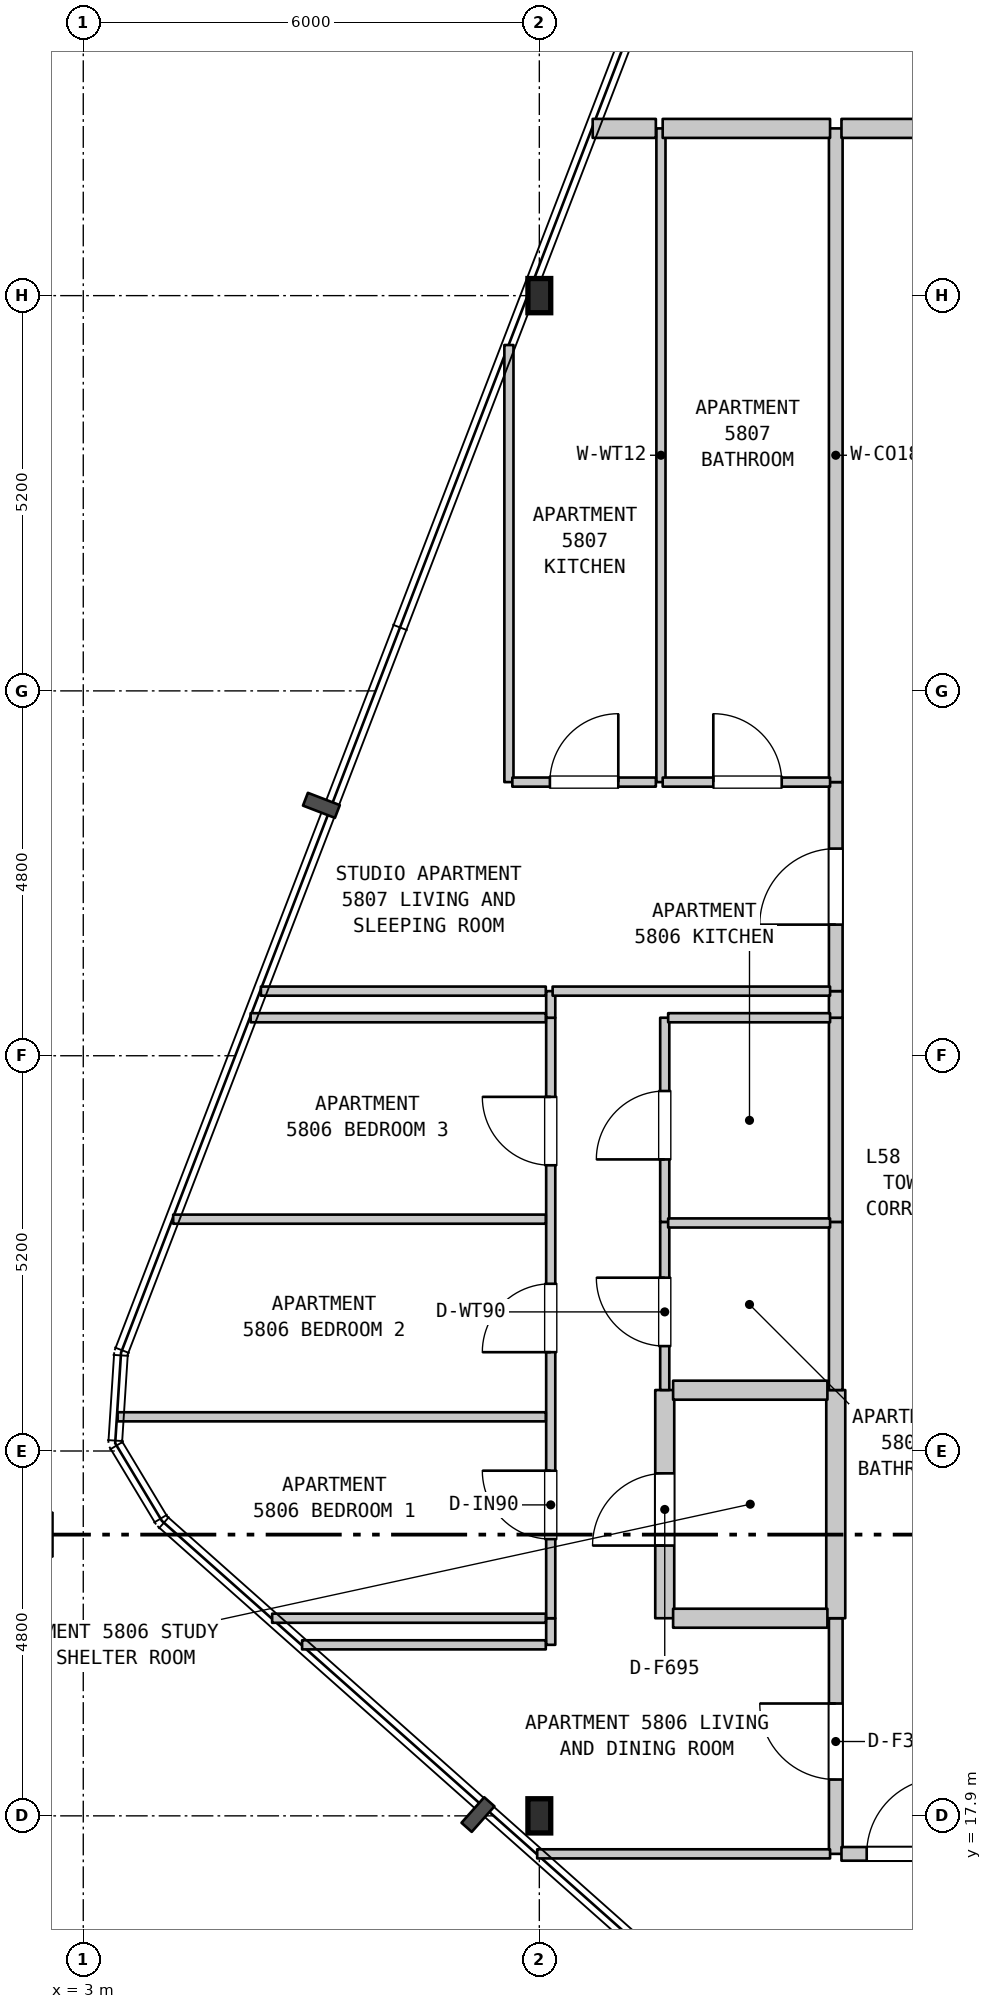
"""IFC4 building model, lengths in metres.
Left out: names, types, materials, properties, quantities, classifications, styles, units other than length and angle.
Written with IfcOpenShell. Run it as: python <this file> out.ifc"""

import sys

from ifc_helpers import new_model, si_unit, direction, frame, frame_2d, origin, origin_2d, place, context, subcontext, project, spatial, rectangle, i_section, extrude, element, fill, save


model = new_model("IFC4")
c1 = context("Model", 3, precision=1e-05, world=origin(), true_north=direction((0.0, 1.0)))
c2 = subcontext(c1, "Body", "Model", "MODEL_VIEW")
j1 = project(units=[si_unit("LENGTHUNIT", "METRE"), si_unit("PLANEANGLEUNIT", "RADIAN")], contexts=[c1])
p1 = place(None, origin())
s1 = spatial("IfcSite", under=j1, at=p1, CompositionType="ELEMENT")
p2 = place(p1, origin())
s2 = spatial("IfcBuilding", under=s1, at=p2, CompositionType="ELEMENT")
p3 = place(p2, frame((0.0, 0.0, 233.9)))
s3 = spatial("IfcBuildingStorey", under=s2, at=p3, CompositionType="ELEMENT", Elevation=233.9)
for number, where, z_axis, x_axis in (
    (1, (9.0, 17.9, 0.0), (0.0, 0.0, 1.0), (1.0, 0.0, 0.0)),
    (2, (9.0, 37.9, 0.0), (0.0, 0.0, 1.0), (1.0, 0.0, 0.0)),
):
    element("IfcColumn", number, at=place(p3, frame(where, z_axis=z_axis, x_axis=x_axis)), inside=s3, PredefinedType="COLUMN", context=c2, shape_type="SweptSolid", body=[
        extrude(i_section(OverallWidth=0.3, OverallDepth=0.45, WebThickness=0.014, FlangeThickness=0.026, FilletRadius=0.027, at=origin_2d()), origin(), (0.0, 0.0, 1.0), 3.7),
    ])
p4 = place(p3, frame((8.6, 31.5, 0.0), z_axis=(0.0, 0.0, 1.0), x_axis=(0.0, 1.0, 0.0)))
e3 = element("IfcWall", 3, at=p4, inside=s3, PredefinedType="PARTITIONING", context=c2, shape_type="SweptSolid", body=[
    extrude(rectangle(XDim=5.75, YDim=0.12, at=frame_2d((2.875, 0.0))), origin(), (0.0, 0.0, 1.0), 3.28),
])
p5 = place(p3, frame((9.15, 20.15, 0.0), z_axis=(0.0, 0.0, 1.0), x_axis=(0.0, 1.0, 0.0)))
e4 = element("IfcWall", 4, at=p5, inside=s3, PredefinedType="PARTITIONING", context=c2, shape_type="SweptSolid", body=[
    extrude(rectangle(XDim=0.35, YDim=0.12, at=frame_2d((0.175, 0.0))), origin(), (0.0, 0.0, 1.0), 3.28),
])
p6 = place(p3, frame((9.15, 20.5, 0.0), z_axis=(0.0, 0.0, 1.0), x_axis=(0.0, 1.0, 0.0)))
e5 = element("IfcWall", 5, at=p6, inside=s3, PredefinedType="PARTITIONING", context=c2, shape_type="SweptSolid", body=[
    extrude(rectangle(XDim=7.9, YDim=0.12, at=frame_2d((3.95, 0.0))), origin(), (0.0, 0.0, 1.0), 2.68),
])
p7 = place(p6, frame((1.041, 0.0, 0.0)))
e6 = element("IfcOpeningElement", 6, at=p7, cuts=e5, PredefinedType="OPENING", context=c2, shape_type="SweptSolid", body=[
    extrude(rectangle(XDim=0.9, YDim=2.15, at=frame_2d((0.45, 1.075))), frame((0.0, 0.07, 0.0), z_axis=(0.0, -1.0, 0.0), x_axis=(1.0, 0.0, 0.0)), (0.0, 0.0, 1.0), 0.14),
])
p8 = place(p6, frame((3.5, 0.0, 0.0)))
e7 = element("IfcOpeningElement", 7, at=p8, cuts=e5, PredefinedType="OPENING", context=c2, shape_type="SweptSolid", body=[
    extrude(rectangle(XDim=0.9, YDim=2.15, at=frame_2d((0.45, 1.075))), frame((0.0, 0.07, 0.0), z_axis=(0.0, -1.0, 0.0), x_axis=(1.0, 0.0, 0.0)), (0.0, 0.0, 1.0), 0.14),
])
p9 = place(p6, frame((5.959, 0.0, 0.0)))
e8 = element("IfcOpeningElement", 8, at=p9, cuts=e5, PredefinedType="OPENING", context=c2, shape_type="SweptSolid", body=[
    extrude(rectangle(XDim=0.9, YDim=2.15, at=frame_2d((0.45, 1.075))), frame((0.0, 0.07, 0.0), z_axis=(0.0, -1.0, 0.0), x_axis=(1.0, 0.0, 0.0)), (0.0, 0.0, 1.0), 0.14),
])
p10 = place(p3, frame((9.15, 28.4, 0.0), z_axis=(0.0, 0.0, 1.0), x_axis=(0.0, 1.0, 0.0)))
e9 = element("IfcWall", 9, at=p10, inside=s3, PredefinedType="PARTITIONING", context=c2, shape_type="SweptSolid", body=[
    extrude(rectangle(XDim=0.35, YDim=0.12, at=frame_2d((0.175, 0.0))), origin(), (0.0, 0.0, 1.0), 3.28),
])
p11 = place(p3, frame((10.6, 31.5, 0.0), z_axis=(0.0, 0.0, 1.0), x_axis=(0.0, 1.0, 0.0)))
e10 = element("IfcWall", 10, at=p11, inside=s3, PredefinedType="PARTITIONING", context=c2, shape_type="SweptSolid", body=[
    extrude(rectangle(XDim=8.6, YDim=0.12, at=frame_2d((4.3, 0.0))), origin(), (0.0, 0.0, 1.0), 3.28),
])
p12 = place(p3, frame((10.65, 20.5, 0.0), z_axis=(0.0, 0.0, 1.0), x_axis=(0.0, 1.0, 0.0)))
e11 = element("IfcWall", 11, at=p12, inside=s3, PredefinedType="STANDARD", context=c2, shape_type="SweptSolid", body=[
    extrude(rectangle(XDim=3.002, YDim=0.25, at=frame_2d((1.501, 0.0))), origin(), (0.0, 0.0, 1.0), 3.28),
])
p13 = place(p12, frame((0.956, 0.0, 0.0)))
e12 = element("IfcOpeningElement", 12, at=p13, cuts=e11, PredefinedType="OPENING", context=c2, shape_type="SweptSolid", body=[
    extrude(rectangle(XDim=0.95, YDim=2.15, at=frame_2d((0.475, 1.075))), frame((0.0, 0.135, 0.0), z_axis=(0.0, -1.0, 0.0), x_axis=(1.0, 0.0, 0.0)), (0.0, 0.0, 1.0), 0.27),
])
p14 = place(p3, frame((10.65, 23.502, 0.0), z_axis=(0.0, 0.0, 1.0), x_axis=(0.0, 1.0, 0.0)))
e13 = element("IfcWall", 13, at=p14, inside=s3, PredefinedType="PARTITIONING", context=c2, shape_type="SweptSolid", body=[
    extrude(rectangle(XDim=2.212, YDim=0.12, at=frame_2d((1.106, 0.0))), origin(), (0.0, 0.0, 1.0), 3.28),
])
p15 = place(p14, frame((0.578, 0.0, 0.0)))
e14 = element("IfcOpeningElement", 14, at=p15, cuts=e13, PredefinedType="OPENING", context=c2, shape_type="SweptSolid", body=[
    extrude(rectangle(XDim=0.9, YDim=2.1, at=frame_2d((0.45, 1.05))), frame((0.0, 0.07, 0.0), z_axis=(0.0, -1.0, 0.0), x_axis=(1.0, 0.0, 0.0)), (0.0, 0.0, 1.0), 0.14),
])
p16 = place(p3, frame((10.65, 25.714, 0.0), z_axis=(0.0, 0.0, 1.0), x_axis=(0.0, 1.0, 0.0)))
e15 = element("IfcWall", 15, at=p16, inside=s3, PredefinedType="PARTITIONING", context=c2, shape_type="SweptSolid", body=[
    extrude(rectangle(XDim=2.686, YDim=0.12, at=frame_2d((1.343, 0.0))), origin(), (0.0, 0.0, 1.0), 3.28),
])
p17 = place(p16, frame((0.822, 0.0, 0.0)))
e16 = element("IfcOpeningElement", 16, at=p17, cuts=e15, PredefinedType="OPENING", context=c2, shape_type="SweptSolid", body=[
    extrude(rectangle(XDim=0.9, YDim=2.15, at=frame_2d((0.45, 1.075))), frame((0.0, 0.07, 0.0), z_axis=(0.0, -1.0, 0.0), x_axis=(1.0, 0.0, 0.0)), (0.0, 0.0, 1.0), 0.14),
])
p18 = place(p3, frame((12.9, 17.4, 0.0), z_axis=(0.0, 0.0, 1.0), x_axis=(0.0, 1.0, 0.0)))
e17 = element("IfcWall", 17, at=p18, inside=s3, PredefinedType="STANDARD", context=c2, shape_type="SweptSolid", body=[
    extrude(rectangle(XDim=3.1, YDim=0.18, at=frame_2d((1.55, 0.0))), origin(), (0.0, 0.0, 1.0), 3.28),
])
p19 = place(p18, frame((0.978, 0.0, 0.0)))
e18 = element("IfcOpeningElement", 18, at=p19, cuts=e17, PredefinedType="OPENING", context=c2, shape_type="SweptSolid", body=[
    extrude(rectangle(XDim=1.0, YDim=2.15, at=frame_2d((0.5, 1.075))), frame((0.0, 0.1, 0.0), z_axis=(0.0, -1.0, 0.0), x_axis=(1.0, 0.0, 0.0)), (0.0, 0.0, 1.0), 0.2),
])
p20 = place(p3, frame((12.9, 20.5, 0.0), z_axis=(0.0, 0.0, 1.0), x_axis=(0.0, 1.0, 0.0)))
e19 = element("IfcWall", 19, at=p20, inside=s3, PredefinedType="STANDARD", context=c2, shape_type="SweptSolid", body=[
    extrude(rectangle(XDim=3.002, YDim=0.25, at=frame_2d((1.501, 0.0))), origin(), (0.0, 0.0, 1.0), 3.28),
])
p21 = place(p3, frame((12.9, 23.502, 0.0), z_axis=(0.0, 0.0, 1.0), x_axis=(0.0, 1.0, 0.0)))
e20 = element("IfcWall", 20, at=p21, inside=s3, PredefinedType="STANDARD", context=c2, shape_type="SweptSolid", body=[
    extrude(rectangle(XDim=2.212, YDim=0.18, at=frame_2d((1.106, 0.0))), origin(), (0.0, 0.0, 1.0), 3.28),
])
p22 = place(p3, frame((12.9, 25.714, 0.0), z_axis=(0.0, 0.0, 1.0), x_axis=(0.0, 1.0, 0.0)))
e21 = element("IfcWall", 21, at=p22, inside=s3, PredefinedType="STANDARD", context=c2, shape_type="SweptSolid", body=[
    extrude(rectangle(XDim=2.686, YDim=0.18, at=frame_2d((1.343, 0.0))), origin(), (0.0, 0.0, 1.0), 3.28),
])
p23 = place(p3, frame((12.9, 28.4, 0.0), z_axis=(0.0, 0.0, 1.0), x_axis=(0.0, 1.0, 0.0)))
e22 = element("IfcWall", 22, at=p23, inside=s3, PredefinedType="STANDARD", context=c2, shape_type="SweptSolid", body=[
    extrude(rectangle(XDim=0.35, YDim=0.18, at=frame_2d((0.175, 0.0))), origin(), (0.0, 0.0, 1.0), 3.28),
])
p24 = place(p3, frame((12.9, 28.75, 0.0), z_axis=(0.0, 0.0, 1.0), x_axis=(0.0, 1.0, 0.0)))
e23 = element("IfcWall", 23, at=p24, inside=s3, PredefinedType="STANDARD", context=c2, shape_type="SweptSolid", body=[
    extrude(rectangle(XDim=2.75, YDim=0.18, at=frame_2d((1.375, 0.0))), origin(), (0.0, 0.0, 1.0), 3.28),
])
p25 = place(p24, frame((0.875, 0.0, 0.0)))
e24 = element("IfcOpeningElement", 24, at=p25, cuts=e23, PredefinedType="OPENING", context=c2, shape_type="SweptSolid", body=[
    extrude(rectangle(XDim=1.0, YDim=2.15, at=frame_2d((0.5, 1.075))), frame((0.0, 0.1, 0.0), z_axis=(0.0, -1.0, 0.0), x_axis=(1.0, 0.0, 0.0)), (0.0, 0.0, 1.0), 0.2),
])
p26 = place(p3, frame((12.9, 31.5, 0.0), z_axis=(0.0, 0.0, 1.0), x_axis=(0.0, 1.0, 0.0)))
e25 = element("IfcWall", 25, at=p26, inside=s3, PredefinedType="STANDARD", context=c2, shape_type="SweptSolid", body=[
    extrude(rectangle(XDim=8.6, YDim=0.18, at=frame_2d((4.3, 0.0))), origin(), (0.0, 0.0, 1.0), 3.28),
])
p27 = place(p3, frame((8.972, 17.4, 0.0), z_axis=(0.0, 0.0, 1.0), x_axis=(1.0, 0.0, 0.0)))
e26 = element("IfcWall", 26, at=p27, inside=s3, PredefinedType="PARTITIONING", context=c2, shape_type="SweptSolid", body=[
    extrude(rectangle(XDim=3.853, YDim=0.12, at=frame_2d((1.927, 0.0))), origin(), (0.0, 0.0, 1.0), 3.28),
])
p28 = place(p3, frame((12.975, 17.4, 0.0), z_axis=(0.0, 0.0, 1.0), x_axis=(1.0, 0.0, 0.0)))
e27 = element("IfcWall", 27, at=p28, inside=s3, PredefinedType="STANDARD", context=c2, shape_type="SweptSolid", body=[
    extrude(rectangle(XDim=3.18, YDim=0.18, at=frame_2d((1.59, 0.0))), origin(), (0.0, 0.0, 1.0), 3.28),
])
p29 = place(p28, frame((0.332, 0.0, 0.0)))
e28 = element("IfcOpeningElement", 28, at=p29, cuts=e27, PredefinedType="OPENING", context=c2, shape_type="SweptSolid", body=[
    extrude(rectangle(XDim=1.0, YDim=2.15, at=frame_2d((0.5, 1.075))), frame((0.0, 0.1, 0.0), z_axis=(0.0, -1.0, 0.0), x_axis=(1.0, 0.0, 0.0)), (0.0, 0.0, 1.0), 0.2),
])
p30 = place(p3, frame((5.879, 20.15, 0.0), z_axis=(0.0, 0.0, 1.0), x_axis=(1.0, 0.0, 0.0)))
e29 = element("IfcWall", 29, at=p30, inside=s3, PredefinedType="PARTITIONING", context=c2, shape_type="SweptSolid", body=[
    extrude(rectangle(XDim=3.206, YDim=0.12, at=frame_2d((1.603, 0.0))), origin(), (0.0, 0.0, 1.0), 3.28),
])
p31 = place(p3, frame((5.485, 20.5, 0.0), z_axis=(0.0, 0.0, 1.0), x_axis=(1.0, 0.0, 0.0)))
e30 = element("IfcWall", 30, at=p31, inside=s3, PredefinedType="PARTITIONING", context=c2, shape_type="SweptSolid", body=[
    extrude(rectangle(XDim=3.6, YDim=0.12, at=frame_2d((1.8, 0.0))), origin(), (0.0, 0.0, 1.0), 3.28),
])
p32 = place(p3, frame((10.76, 20.5, 0.0), z_axis=(0.0, 0.0, 1.0), x_axis=(1.0, 0.0, 0.0)))
e31 = element("IfcWall", 31, at=p32, inside=s3, PredefinedType="STANDARD", context=c2, shape_type="SweptSolid", body=[
    extrude(rectangle(XDim=2.03, YDim=0.25, at=frame_2d((1.015, 0.0))), origin(), (0.0, 0.0, 1.0), 3.28),
])
p33 = place(p3, frame((3.452, 23.15, 0.0), z_axis=(0.0, 0.0, 1.0), x_axis=(1.0, 0.0, 0.0)))
e32 = element("IfcWall", 32, at=p33, inside=s3, PredefinedType="PARTITIONING", context=c2, shape_type="SweptSolid", body=[
    extrude(rectangle(XDim=5.633, YDim=0.12, at=frame_2d((2.816, 0.0))), origin(), (0.0, 0.0, 1.0), 3.28),
])
p34 = place(p3, frame((10.76, 23.5, 0.0), z_axis=(0.0, 0.0, 1.0), x_axis=(1.0, 0.0, 0.0)))
e33 = element("IfcWall", 33, at=p34, inside=s3, PredefinedType="STANDARD", context=c2, shape_type="SweptSolid", body=[
    extrude(rectangle(XDim=2.03, YDim=0.25, at=frame_2d((1.015, 0.0))), origin(), (0.0, 0.0, 1.0), 3.28),
])
p35 = place(p3, frame((10.695, 25.7, 0.0), z_axis=(0.0, 0.0, 1.0), x_axis=(1.0, 0.0, 0.0)))
e34 = element("IfcWall", 34, at=p35, inside=s3, PredefinedType="PARTITIONING", context=c2, shape_type="SweptSolid", body=[
    extrude(rectangle(XDim=2.13, YDim=0.12, at=frame_2d((1.065, 0.0))), origin(), (0.0, 0.0, 1.0), 3.28),
])
p36 = place(p3, frame((4.183, 25.75, 0.0), z_axis=(0.0, 0.0, 1.0), x_axis=(1.0, 0.0, 0.0)))
e35 = element("IfcWall", 35, at=p36, inside=s3, PredefinedType="PARTITIONING", context=c2, shape_type="SweptSolid", body=[
    extrude(rectangle(XDim=4.902, YDim=0.12, at=frame_2d((2.451, 0.0))), origin(), (0.0, 0.0, 1.0), 3.28),
])
p37 = place(p3, frame((5.202, 28.4, 0.0), z_axis=(0.0, 0.0, 1.0), x_axis=(1.0, 0.0, 0.0)))
e36 = element("IfcWall", 36, at=p37, inside=s3, PredefinedType="PARTITIONING", context=c2, shape_type="SweptSolid", body=[
    extrude(rectangle(XDim=3.883, YDim=0.12, at=frame_2d((1.941, 0.0))), origin(), (0.0, 0.0, 1.0), 3.28),
])
p38 = place(p3, frame((10.695, 28.4, 0.0), z_axis=(0.0, 0.0, 1.0), x_axis=(1.0, 0.0, 0.0)))
e37 = element("IfcWall", 37, at=p38, inside=s3, PredefinedType="PARTITIONING", context=c2, shape_type="SweptSolid", body=[
    extrude(rectangle(XDim=2.13, YDim=0.12, at=frame_2d((1.065, 0.0))), origin(), (0.0, 0.0, 1.0), 3.28),
])
p39 = place(p3, frame((5.337, 28.75, 0.0), z_axis=(0.0, 0.0, 1.0), x_axis=(1.0, 0.0, 0.0)))
e38 = element("IfcWall", 38, at=p39, inside=s3, PredefinedType="PARTITIONING", context=c2, shape_type="SweptSolid", body=[
    extrude(rectangle(XDim=3.748, YDim=0.12, at=frame_2d((1.874, 0.0))), origin(), (0.0, 0.0, 1.0), 3.28),
])
p40 = place(p3, frame((9.175, 28.75, 0.0), z_axis=(0.0, 0.0, 1.0), x_axis=(1.0, 0.0, 0.0)))
e39 = element("IfcWall", 39, at=p40, inside=s3, PredefinedType="PARTITIONING", context=c2, shape_type="SweptSolid", body=[
    extrude(rectangle(XDim=3.65, YDim=0.12, at=frame_2d((1.825, 0.0))), origin(), (0.0, 0.0, 1.0), 3.28),
])
p41 = place(p3, frame((8.645, 31.5, 0.0), z_axis=(0.0, 0.0, 1.0), x_axis=(1.0, 0.0, 0.0)))
e40 = element("IfcWall", 40, at=p41, inside=s3, PredefinedType="PARTITIONING", context=c2, shape_type="SweptSolid", body=[
    extrude(rectangle(XDim=1.888, YDim=0.12, at=frame_2d((0.944, 0.0))), origin(), (0.0, 0.0, 1.0), 3.28),
])
p42 = place(p41, frame((0.494, 0.0, 0.0)))
e41 = element("IfcOpeningElement", 41, at=p42, cuts=e40, PredefinedType="OPENING", context=c2, shape_type="SweptSolid", body=[
    extrude(rectangle(XDim=0.9, YDim=2.15, at=frame_2d((0.45, 1.075))), frame((0.0, 0.07, 0.0), z_axis=(0.0, -1.0, 0.0), x_axis=(1.0, 0.0, 0.0)), (0.0, 0.0, 1.0), 0.14),
])
p43 = place(p3, frame((10.623, 31.5, 0.0), z_axis=(0.0, 0.0, 1.0), x_axis=(1.0, 0.0, 0.0)))
e42 = element("IfcWall", 42, at=p43, inside=s3, PredefinedType="PARTITIONING", context=c2, shape_type="SweptSolid", body=[
    extrude(rectangle(XDim=2.202, YDim=0.12, at=frame_2d((1.101, 0.0))), origin(), (0.0, 0.0, 1.0), 3.28),
])
p44 = place(p43, frame((0.666, 0.0, 0.0)))
e43 = element("IfcOpeningElement", 43, at=p44, cuts=e42, PredefinedType="OPENING", context=c2, shape_type="SweptSolid", body=[
    extrude(rectangle(XDim=0.9, YDim=2.1, at=frame_2d((0.45, 1.05))), frame((0.0, 0.07, 0.0), z_axis=(0.0, -1.0, 0.0), x_axis=(1.0, 0.0, 0.0)), (0.0, 0.0, 1.0), 0.14),
])
p45 = place(p3, frame((9.702, 40.1, 0.0), z_axis=(0.0, 0.0, 1.0), x_axis=(1.0, 0.0, 0.0)))
e44 = element("IfcWall", 44, at=p45, inside=s3, PredefinedType="STANDARD", context=c2, shape_type="SweptSolid", body=[
    extrude(rectangle(XDim=0.831, YDim=0.25, at=frame_2d((0.416, 0.0))), origin(), (0.0, 0.0, 1.0), 3.28),
])
p46 = place(p3, frame((10.623, 40.1, 0.0), z_axis=(0.0, 0.0, 1.0), x_axis=(1.0, 0.0, 0.0)))
e45 = element("IfcWall", 45, at=p46, inside=s3, PredefinedType="STANDARD", context=c2, shape_type="SweptSolid", body=[
    extrude(rectangle(XDim=2.202, YDim=0.25, at=frame_2d((1.101, 0.0))), origin(), (0.0, 0.0, 1.0), 3.28),
])
p47 = place(p3, frame((12.975, 40.1, 0.0), z_axis=(0.0, 0.0, 1.0), x_axis=(1.0, 0.0, 0.0)))
e46 = element("IfcWall", 46, at=p47, inside=s3, PredefinedType="STANDARD", context=c2, shape_type="SweptSolid", body=[
    extrude(rectangle(XDim=1.48, YDim=0.25, at=frame_2d((0.74, 0.0))), origin(), (0.0, 0.0, 1.0), 3.28),
])
p48 = place(p7, origin())
e47 = element("IfcDoor", 47, at=p48, inside=s3, OperationType="SINGLE_SWING_RIGHT", PredefinedType="DOOR", context=c2, shape_type="SweptSolid", body=[
    extrude(rectangle(XDim=0.9, YDim=2.15, at=frame_2d((0.45, 1.075))), frame((0.0, 0.025, 0.0), z_axis=(0.0, -1.0, 0.0), x_axis=(1.0, 0.0, 0.0)), (0.0, 0.0, 1.0), 0.05),
])
fill(e6, e47)
p49 = place(p8, origin())
e48 = element("IfcDoor", 48, at=p49, inside=s3, OperationType="SINGLE_SWING_LEFT", PredefinedType="DOOR", context=c2, shape_type="SweptSolid", body=[
    extrude(rectangle(XDim=0.9, YDim=2.15, at=frame_2d((0.45, 1.075))), frame((0.0, 0.025, 0.0), z_axis=(0.0, -1.0, 0.0), x_axis=(1.0, 0.0, 0.0)), (0.0, 0.0, 1.0), 0.05),
])
fill(e7, e48)
p50 = place(p9, origin())
e49 = element("IfcDoor", 49, at=p50, inside=s3, OperationType="SINGLE_SWING_RIGHT", PredefinedType="DOOR", context=c2, shape_type="SweptSolid", body=[
    extrude(rectangle(XDim=0.9, YDim=2.15, at=frame_2d((0.45, 1.075))), frame((0.0, 0.025, 0.0), z_axis=(0.0, -1.0, 0.0), x_axis=(1.0, 0.0, 0.0)), (0.0, 0.0, 1.0), 0.05),
])
fill(e8, e49)
p51 = place(p13, origin())
e50 = element("IfcDoor", 50, at=p51, inside=s3, OperationType="SINGLE_SWING_LEFT", PredefinedType="DOOR", context=c2, shape_type="SweptSolid", body=[
    extrude(rectangle(XDim=0.95, YDim=2.15, at=frame_2d((0.475, 1.075))), frame((0.0, 0.025, 0.0), z_axis=(0.0, -1.0, 0.0), x_axis=(1.0, 0.0, 0.0)), (0.0, 0.0, 1.0), 0.05),
])
fill(e12, e50)
p52 = place(p15, origin())
e51 = element("IfcDoor", 51, at=p52, inside=s3, OperationType="SINGLE_SWING_RIGHT", PredefinedType="DOOR", context=c2, shape_type="SweptSolid", body=[
    extrude(rectangle(XDim=0.9, YDim=2.1, at=frame_2d((0.45, 1.05))), frame((0.0, 0.025, 0.0), z_axis=(0.0, -1.0, 0.0), x_axis=(1.0, 0.0, 0.0)), (0.0, 0.0, 1.0), 0.05),
])
fill(e14, e51)
p53 = place(p17, origin())
e52 = element("IfcDoor", 52, at=p53, inside=s3, OperationType="SINGLE_SWING_LEFT", PredefinedType="DOOR", context=c2, shape_type="SweptSolid", body=[
    extrude(rectangle(XDim=0.9, YDim=2.15, at=frame_2d((0.45, 1.075))), frame((0.0, 0.025, 0.0), z_axis=(0.0, -1.0, 0.0), x_axis=(1.0, 0.0, 0.0)), (0.0, 0.0, 1.0), 0.05),
])
fill(e16, e52)
p54 = place(p19, origin())
e53 = element("IfcDoor", 53, at=p54, inside=s3, OperationType="SINGLE_SWING_RIGHT", PredefinedType="DOOR", context=c2, shape_type="SweptSolid", body=[
    extrude(rectangle(XDim=1.0, YDim=2.15, at=frame_2d((0.5, 1.075))), frame((0.0, 0.025, 0.0), z_axis=(0.0, -1.0, 0.0), x_axis=(1.0, 0.0, 0.0)), (0.0, 0.0, 1.0), 0.05),
])
fill(e18, e53)
p55 = place(p25, origin())
e54 = element("IfcDoor", 54, at=p55, inside=s3, OperationType="SINGLE_SWING_LEFT", PredefinedType="DOOR", context=c2, shape_type="SweptSolid", body=[
    extrude(rectangle(XDim=1.0, YDim=2.15, at=frame_2d((0.5, 1.075))), frame((0.0, 0.025, 0.0), z_axis=(0.0, -1.0, 0.0), x_axis=(1.0, 0.0, 0.0)), (0.0, 0.0, 1.0), 0.05),
])
fill(e24, e54)
p56 = place(p29, origin())
e55 = element("IfcDoor", 55, at=p56, inside=s3, OperationType="SINGLE_SWING_RIGHT", PredefinedType="DOOR", context=c2, shape_type="SweptSolid", body=[
    extrude(rectangle(XDim=1.0, YDim=2.15, at=frame_2d((0.5, 1.075))), frame((0.0, 0.025, 0.0), z_axis=(0.0, -1.0, 0.0), x_axis=(1.0, 0.0, 0.0)), (0.0, 0.0, 1.0), 0.05),
])
fill(e28, e55)
p57 = place(p42, origin())
e56 = element("IfcDoor", 56, at=p57, inside=s3, OperationType="SINGLE_SWING_RIGHT", PredefinedType="DOOR", context=c2, shape_type="SweptSolid", body=[
    extrude(rectangle(XDim=0.9, YDim=2.15, at=frame_2d((0.45, 1.075))), frame((0.0, 0.025, 0.0), z_axis=(0.0, -1.0, 0.0), x_axis=(1.0, 0.0, 0.0)), (0.0, 0.0, 1.0), 0.05),
])
fill(e41, e56)
p58 = place(p44, origin())
e57 = element("IfcDoor", 57, at=p58, inside=s3, OperationType="SINGLE_SWING_LEFT", PredefinedType="DOOR", context=c2, shape_type="SweptSolid", body=[
    extrude(rectangle(XDim=0.9, YDim=2.1, at=frame_2d((0.45, 1.05))), frame((0.0, 0.025, 0.0), z_axis=(0.0, -1.0, 0.0), x_axis=(1.0, 0.0, 0.0)), (0.0, 0.0, 1.0), 0.05),
])
fill(e43, e57)
save(model, sys.argv[1])
